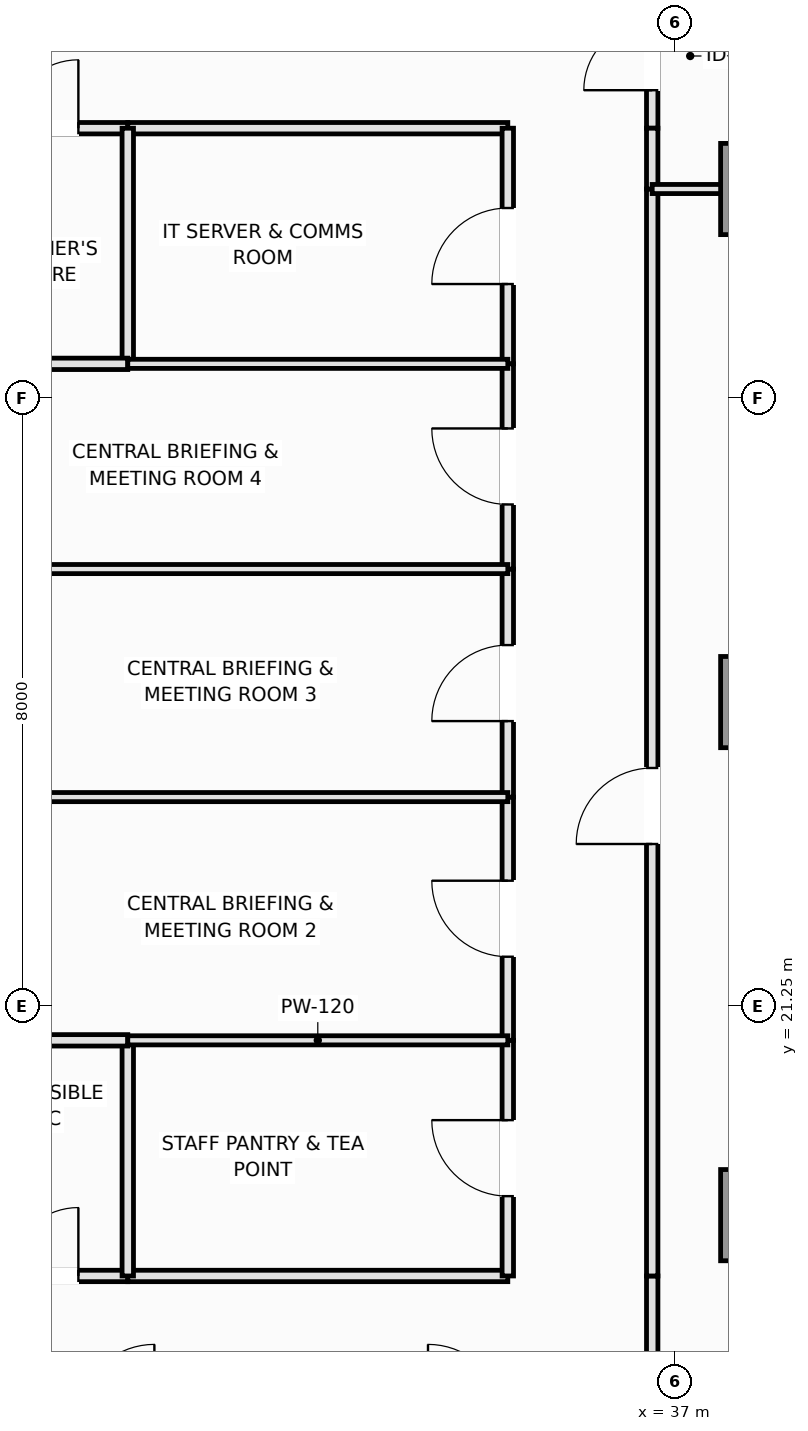
"""IFC4 building model, lengths in metres.
Left out: names, types, materials, properties, quantities, classifications, styles, units other than length and angle.
Written with IfcOpenShell. Run it as: python <this file> out.ifc"""

import sys

from ifc_helpers import new_model, si_unit, direction, frame, frame_2d, origin, origin_2d, place, context, subcontext, project, spatial, rectangle, extrude, element, fill, save


model = new_model("IFC4")
c1 = context("Model", 3, precision=1e-05, world=origin(), true_north=direction((0.0, 1.0)))
c2 = subcontext(c1, "Body", "Model", "MODEL_VIEW")
j1 = project(units=[si_unit("LENGTHUNIT", "METRE"), si_unit("PLANEANGLEUNIT", "RADIAN")], contexts=[c1])
p1 = place(None, origin())
s1 = spatial("IfcSite", under=j1, at=p1, CompositionType="ELEMENT")
p2 = place(p1, origin())
s2 = spatial("IfcBuilding", under=s1, at=p2, CompositionType="ELEMENT")
p3 = place(p2, frame((0.0, 0.0, 75.3)))
s3 = spatial("IfcBuildingStorey", under=s2, at=p3, CompositionType="ELEMENT", Elevation=75.3)
for number, where, z_axis, x_axis in (
    (1, (38.2, 18.5, 0.0), (0.0, 0.0, 1.0), (1.0, 0.0, 0.0)),
    (2, (38.2, 25.25, 0.0), (0.0, 0.0, 1.0), (1.0, 0.0, 0.0)),
    (3, (38.2, 32.0, 0.0), (0.0, 0.0, 1.0), (1.0, 0.0, 0.0)),
):
    element("IfcColumn", number, at=place(p3, frame(where, z_axis=z_axis, x_axis=x_axis)), inside=s3, PredefinedType="COLUMN", context=c2, shape_type="SweptSolid", body=[
        extrude(rectangle(XDim=1.2, YDim=1.2, at=origin_2d()), origin(), (0.0, 0.0, 1.0), 3.55),
    ])
p4 = place(p3, frame((27.6, 17.7, 0.0), z_axis=(0.0, 0.0, 1.0), x_axis=(1.0, 0.0, 0.0)))
e4 = element("IfcWall", 4, at=p4, inside=s3, PredefinedType="PLUMBINGWALL", context=c2, shape_type="SweptSolid", body=[
    extrude(rectangle(XDim=2.2, YDim=0.15, at=frame_2d((1.1, 0.0))), origin(), (0.0, 0.0, 1.0), 3.37),
])
p5 = place(p4, frame((0.65, 0.0, 0.0)))
e5 = element("IfcOpeningElement", 5, at=p5, cuts=e4, PredefinedType="OPENING", context=c2, shape_type="SweptSolid", body=[
    extrude(rectangle(XDim=0.9, YDim=2.1, at=frame_2d((0.45, 1.05))), frame((0.0, 0.085, 0.0), z_axis=(0.0, -1.0, 0.0), x_axis=(1.0, 0.0, 0.0)), (0.0, 0.0, 1.0), 0.17),
])
p6 = place(p3, frame((29.8, 17.7, 0.0), z_axis=(0.0, 0.0, 1.0), x_axis=(1.0, 0.0, 0.0)))
e6 = element("IfcWall", 6, at=p6, inside=s3, PredefinedType="PARTITIONING", context=c2, shape_type="SweptSolid", body=[
    extrude(rectangle(XDim=5.0, YDim=0.15, at=frame_2d((2.5, 0.0))), origin(), (0.0, 0.0, 1.0), 3.37),
])
p7 = place(p3, frame((36.7, 15.8, 0.0), z_axis=(0.0, 0.0, 1.0), x_axis=(0.0, 1.0, 0.0)))
e7 = element("IfcWall", 7, at=p7, inside=s3, PredefinedType="PARTITIONING", context=c2, shape_type="SweptSolid", body=[
    extrude(rectangle(XDim=1.9, YDim=0.15, at=frame_2d((0.95, 0.0))), origin(), (0.0, 0.0, 1.0), 3.37),
])
p8 = place(p3, frame((27.6, 32.8, 0.0), z_axis=(0.0, 0.0, 1.0), x_axis=(1.0, 0.0, 0.0)))
e8 = element("IfcWall", 8, at=p8, inside=s3, PredefinedType="PLUMBINGWALL", context=c2, shape_type="SweptSolid", body=[
    extrude(rectangle(XDim=2.2, YDim=0.15, at=frame_2d((1.1, 0.0))), origin(), (0.0, 0.0, 1.0), 3.37),
])
p9 = place(p8, frame((0.65, 0.0, 0.0)))
e9 = element("IfcOpeningElement", 9, at=p9, cuts=e8, PredefinedType="OPENING", context=c2, shape_type="SweptSolid", body=[
    extrude(rectangle(XDim=0.9, YDim=2.1, at=frame_2d((0.45, 1.05))), frame((0.0, 0.085, 0.0), z_axis=(0.0, -1.0, 0.0), x_axis=(1.0, 0.0, 0.0)), (0.0, 0.0, 1.0), 0.17),
])
p10 = place(p3, frame((29.8, 32.8, 0.0), z_axis=(0.0, 0.0, 1.0), x_axis=(1.0, 0.0, 0.0)))
e10 = element("IfcWall", 10, at=p10, inside=s3, PredefinedType="PARTITIONING", context=c2, shape_type="SweptSolid", body=[
    extrude(rectangle(XDim=5.0, YDim=0.15, at=frame_2d((2.5, 0.0))), origin(), (0.0, 0.0, 1.0), 3.37),
])
p11 = place(p3, frame((36.7, 32.8, 0.0), z_axis=(0.0, 0.0, 1.0), x_axis=(0.0, 1.0, 0.0)))
e11 = element("IfcWall", 11, at=p11, inside=s3, PredefinedType="PARTITIONING", context=c2, shape_type="SweptSolid", body=[
    extrude(rectangle(XDim=1.9, YDim=0.15, at=frame_2d((0.95, 0.0))), origin(), (0.0, 0.0, 1.0), 3.37),
])
p12 = place(p11, frame((0.5, 0.0, 0.0)))
e12 = element("IfcOpeningElement", 12, at=p12, cuts=e11, PredefinedType="OPENING", context=c2, shape_type="SweptSolid", body=[
    extrude(rectangle(XDim=0.9, YDim=2.1, at=frame_2d((0.45, 1.05))), frame((0.0, 0.085, 0.0), z_axis=(0.0, -1.0, 0.0), x_axis=(1.0, 0.0, 0.0)), (0.0, 0.0, 1.0), 0.17),
])
p13 = place(p3, frame((34.8, 17.7, 0.0), z_axis=(0.0, 0.0, 1.0), x_axis=(0.0, 1.0, 0.0)))
e13 = element("IfcWall", 13, at=p13, inside=s3, PredefinedType="PARTITIONING", context=c2, shape_type="SweptSolid", body=[
    extrude(rectangle(XDim=3.1, YDim=0.15, at=frame_2d((1.55, 0.0))), origin(), (0.0, 0.0, 1.0), 3.37),
])
p14 = place(p13, frame((1.05, 0.0, 0.0)))
e14 = element("IfcOpeningElement", 14, at=p14, cuts=e13, PredefinedType="OPENING", context=c2, shape_type="SweptSolid", body=[
    extrude(rectangle(XDim=1.0, YDim=2.15, at=frame_2d((0.5, 1.075))), frame((0.0, 0.085, 0.0), z_axis=(0.0, -1.0, 0.0), x_axis=(1.0, 0.0, 0.0)), (0.0, 0.0, 1.0), 0.17),
])
p15 = place(p3, frame((34.8, 29.7, 0.0), z_axis=(0.0, 0.0, 1.0), x_axis=(0.0, 1.0, 0.0)))
e15 = element("IfcWall", 15, at=p15, inside=s3, PredefinedType="PARTITIONING", context=c2, shape_type="SweptSolid", body=[
    extrude(rectangle(XDim=3.1, YDim=0.15, at=frame_2d((1.55, 0.0))), origin(), (0.0, 0.0, 1.0), 3.37),
])
p16 = place(p15, frame((1.05, 0.0, 0.0)))
e16 = element("IfcOpeningElement", 16, at=p16, cuts=e15, PredefinedType="OPENING", context=c2, shape_type="SweptSolid", body=[
    extrude(rectangle(XDim=1.0, YDim=2.15, at=frame_2d((0.5, 1.075))), frame((0.0, 0.085, 0.0), z_axis=(0.0, -1.0, 0.0), x_axis=(1.0, 0.0, 0.0)), (0.0, 0.0, 1.0), 0.17),
])
p17 = place(p3, frame((34.8, 20.8, 0.0), z_axis=(0.0, 0.0, 1.0), x_axis=(0.0, 1.0, 0.0)))
e17 = element("IfcWall", 17, at=p17, inside=s3, PredefinedType="PARTITIONING", context=c2, shape_type="SweptSolid", body=[
    extrude(rectangle(XDim=3.2, YDim=0.15, at=frame_2d((1.6, 0.0))), origin(), (0.0, 0.0, 1.0), 3.37),
])
p18 = place(p17, frame((1.1, 0.0, 0.0)))
e18 = element("IfcOpeningElement", 18, at=p18, cuts=e17, PredefinedType="OPENING", context=c2, shape_type="SweptSolid", body=[
    extrude(rectangle(XDim=1.0, YDim=2.15, at=frame_2d((0.5, 1.075))), frame((0.0, 0.085, 0.0), z_axis=(0.0, -1.0, 0.0), x_axis=(1.0, 0.0, 0.0)), (0.0, 0.0, 1.0), 0.17),
])
p19 = place(p3, frame((34.8, 24.0, 0.0), z_axis=(0.0, 0.0, 1.0), x_axis=(0.0, 1.0, 0.0)))
e19 = element("IfcWall", 19, at=p19, inside=s3, PredefinedType="PARTITIONING", context=c2, shape_type="SweptSolid", body=[
    extrude(rectangle(XDim=3.0, YDim=0.15, at=frame_2d((1.5, 0.0))), origin(), (0.0, 0.0, 1.0), 3.37),
])
p20 = place(p19, frame((1.0, 0.0, 0.0)))
e20 = element("IfcOpeningElement", 20, at=p20, cuts=e19, PredefinedType="OPENING", context=c2, shape_type="SweptSolid", body=[
    extrude(rectangle(XDim=1.0, YDim=2.15, at=frame_2d((0.5, 1.075))), frame((0.0, 0.085, 0.0), z_axis=(0.0, -1.0, 0.0), x_axis=(1.0, 0.0, 0.0)), (0.0, 0.0, 1.0), 0.17),
])
p21 = place(p3, frame((34.8, 27.0, 0.0), z_axis=(0.0, 0.0, 1.0), x_axis=(0.0, 1.0, 0.0)))
e21 = element("IfcWall", 21, at=p21, inside=s3, PredefinedType="PARTITIONING", context=c2, shape_type="SweptSolid", body=[
    extrude(rectangle(XDim=2.7, YDim=0.15, at=frame_2d((1.35, 0.0))), origin(), (0.0, 0.0, 1.0), 3.37),
])
p22 = place(p21, frame((0.85, 0.0, 0.0)))
e22 = element("IfcOpeningElement", 22, at=p22, cuts=e21, PredefinedType="OPENING", context=c2, shape_type="SweptSolid", body=[
    extrude(rectangle(XDim=1.0, YDim=2.15, at=frame_2d((0.5, 1.075))), frame((0.0, 0.085, 0.0), z_axis=(0.0, -1.0, 0.0), x_axis=(1.0, 0.0, 0.0)), (0.0, 0.0, 1.0), 0.17),
])
p23 = place(p3, frame((36.7, 17.7, 0.0), z_axis=(0.0, 0.0, 1.0), x_axis=(0.0, 1.0, 0.0)))
e23 = element("IfcWall", 23, at=p23, inside=s3, PredefinedType="PARTITIONING", context=c2, shape_type="SweptSolid", body=[
    extrude(rectangle(XDim=14.3, YDim=0.15, at=frame_2d((7.15, 0.0))), origin(), (0.0, 0.0, 1.0), 3.37),
])
p24 = place(p23, frame((5.683, 0.0, 0.0)))
e24 = element("IfcOpeningElement", 24, at=p24, cuts=e23, PredefinedType="OPENING", context=c2, shape_type="SweptSolid", body=[
    extrude(rectangle(XDim=1.0, YDim=2.15, at=frame_2d((0.5, 1.075))), frame((0.0, 0.085, 0.0), z_axis=(0.0, -1.0, 0.0), x_axis=(1.0, 0.0, 0.0)), (0.0, 0.0, 1.0), 0.17),
])
p25 = place(p3, frame((36.7, 32.0, 0.0), z_axis=(0.0, 0.0, 1.0), x_axis=(0.0, 1.0, 0.0)))
e25 = element("IfcWall", 25, at=p25, inside=s3, PredefinedType="PARTITIONING", context=c2, shape_type="SweptSolid", body=[
    extrude(rectangle(XDim=0.8, YDim=0.15, at=frame_2d((0.4, 0.0))), origin(), (0.0, 0.0, 1.0), 3.37),
])
p26 = place(p3, frame((29.8, 17.7, 0.0), z_axis=(0.0, 0.0, 1.0), x_axis=(0.0, 1.0, 0.0)))
e26 = element("IfcWall", 26, at=p26, inside=s3, PredefinedType="PLUMBINGWALL", context=c2, shape_type="SweptSolid", body=[
    extrude(rectangle(XDim=3.1, YDim=0.15, at=frame_2d((1.55, 0.0))), origin(), (0.0, 0.0, 1.0), 3.37),
])
p27 = place(p3, frame((27.6, 20.8, 0.0), z_axis=(0.0, 0.0, 1.0), x_axis=(1.0, 0.0, 0.0)))
e27 = element("IfcWall", 27, at=p27, inside=s3, PredefinedType="PLUMBINGWALL", context=c2, shape_type="SweptSolid", body=[
    extrude(rectangle(XDim=2.2, YDim=0.15, at=frame_2d((1.1, 0.0))), origin(), (0.0, 0.0, 1.0), 3.37),
])
p28 = place(p3, frame((29.8, 29.7, 0.0), z_axis=(0.0, 0.0, 1.0), x_axis=(0.0, 1.0, 0.0)))
e28 = element("IfcWall", 28, at=p28, inside=s3, PredefinedType="PLUMBINGWALL", context=c2, shape_type="SweptSolid", body=[
    extrude(rectangle(XDim=3.1, YDim=0.15, at=frame_2d((1.55, 0.0))), origin(), (0.0, 0.0, 1.0), 3.37),
])
p29 = place(p3, frame((27.6, 29.7, 0.0), z_axis=(0.0, 0.0, 1.0), x_axis=(1.0, 0.0, 0.0)))
e29 = element("IfcWall", 29, at=p29, inside=s3, PredefinedType="PLUMBINGWALL", context=c2, shape_type="SweptSolid", body=[
    extrude(rectangle(XDim=2.2, YDim=0.15, at=frame_2d((1.1, 0.0))), origin(), (0.0, 0.0, 1.0), 3.37),
])
for number, where, z_axis, x_axis in (
    (30, (29.8, 20.8, 0.0), (0.0, 0.0, 1.0), (1.0, 0.0, 0.0)),
    (31, (29.8, 29.7, 0.0), (0.0, 0.0, 1.0), (1.0, 0.0, 0.0)),
):
    element("IfcWall", number, at=place(p3, frame(where, z_axis=z_axis, x_axis=x_axis)), inside=s3, PredefinedType="PARTITIONING", context=c2, shape_type="SweptSolid", body=[
        extrude(rectangle(XDim=5.0, YDim=0.12, at=frame_2d((2.5, 0.0))), origin(), (0.0, 0.0, 1.0), 3.37),
    ])
for number, where, z_axis, x_axis in (
    (32, (27.5, 24.0, 0.0), (0.0, 0.0, 1.0), (1.0, 0.0, 0.0)),
    (33, (27.5, 27.0, 0.0), (0.0, 0.0, 1.0), (1.0, 0.0, 0.0)),
):
    element("IfcWall", number, at=place(p3, frame(where, z_axis=z_axis, x_axis=x_axis)), inside=s3, PredefinedType="PARTITIONING", context=c2, shape_type="SweptSolid", body=[
        extrude(rectangle(XDim=7.3, YDim=0.12, at=frame_2d((3.65, 0.0))), origin(), (0.0, 0.0, 1.0), 3.37),
    ])
p30 = place(p3, frame((36.7, 32.0, 0.0), z_axis=(0.0, 0.0, 1.0), x_axis=(1.0, 0.0, 0.0)))
e34 = element("IfcWall", 34, at=p30, inside=s3, PredefinedType="PARTITIONING", context=c2, shape_type="SweptSolid", body=[
    extrude(rectangle(XDim=16.79, YDim=0.12, at=frame_2d((8.395, 0.0))), origin(), (0.0, 0.0, 1.0), 2.72),
])
p31 = place(p5, origin())
e35 = element("IfcDoor", 35, at=p31, inside=s3, OperationType="SINGLE_SWING_RIGHT", PredefinedType="DOOR", context=c2, shape_type="SweptSolid", body=[
    extrude(rectangle(XDim=0.9, YDim=2.1, at=frame_2d((0.45, 1.05))), frame((0.0, 0.025, 0.0), z_axis=(0.0, -1.0, 0.0), x_axis=(1.0, 0.0, 0.0)), (0.0, 0.0, 1.0), 0.05),
])
fill(e5, e35)
p32 = place(p9, origin())
e36 = element("IfcDoor", 36, at=p32, inside=s3, OperationType="SINGLE_SWING_RIGHT", PredefinedType="DOOR", context=c2, shape_type="SweptSolid", body=[
    extrude(rectangle(XDim=0.9, YDim=2.1, at=frame_2d((0.45, 1.05))), frame((0.0, 0.025, 0.0), z_axis=(0.0, -1.0, 0.0), x_axis=(1.0, 0.0, 0.0)), (0.0, 0.0, 1.0), 0.05),
])
fill(e9, e36)
p33 = place(p12, origin())
e37 = element("IfcDoor", 37, at=p33, inside=s3, OperationType="SINGLE_SWING_LEFT", PredefinedType="DOOR", context=c2, shape_type="SweptSolid", body=[
    extrude(rectangle(XDim=0.9, YDim=2.1, at=frame_2d((0.45, 1.05))), frame((0.0, 0.025, 0.0), z_axis=(0.0, -1.0, 0.0), x_axis=(1.0, 0.0, 0.0)), (0.0, 0.0, 1.0), 0.05),
])
fill(e12, e37)
p34 = place(p14, origin())
e38 = element("IfcDoor", 38, at=p34, inside=s3, OperationType="SINGLE_SWING_RIGHT", PredefinedType="DOOR", context=c2, shape_type="SweptSolid", body=[
    extrude(rectangle(XDim=1.0, YDim=2.15, at=frame_2d((0.5, 1.075))), frame((0.0, 0.025, 0.0), z_axis=(0.0, -1.0, 0.0), x_axis=(1.0, 0.0, 0.0)), (0.0, 0.0, 1.0), 0.05),
])
fill(e14, e38)
p35 = place(p16, origin())
e39 = element("IfcDoor", 39, at=p35, inside=s3, OperationType="SINGLE_SWING_LEFT", PredefinedType="DOOR", context=c2, shape_type="SweptSolid", body=[
    extrude(rectangle(XDim=1.0, YDim=2.15, at=frame_2d((0.5, 1.075))), frame((0.0, 0.025, 0.0), z_axis=(0.0, -1.0, 0.0), x_axis=(1.0, 0.0, 0.0)), (0.0, 0.0, 1.0), 0.05),
])
fill(e16, e39)
p36 = place(p18, origin())
e40 = element("IfcDoor", 40, at=p36, inside=s3, OperationType="SINGLE_SWING_RIGHT", PredefinedType="DOOR", context=c2, shape_type="SweptSolid", body=[
    extrude(rectangle(XDim=1.0, YDim=2.15, at=frame_2d((0.5, 1.075))), frame((0.0, 0.025, 0.0), z_axis=(0.0, -1.0, 0.0), x_axis=(1.0, 0.0, 0.0)), (0.0, 0.0, 1.0), 0.05),
])
fill(e18, e40)
p37 = place(p20, origin())
e41 = element("IfcDoor", 41, at=p37, inside=s3, OperationType="SINGLE_SWING_LEFT", PredefinedType="DOOR", context=c2, shape_type="SweptSolid", body=[
    extrude(rectangle(XDim=1.0, YDim=2.15, at=frame_2d((0.5, 1.075))), frame((0.0, 0.025, 0.0), z_axis=(0.0, -1.0, 0.0), x_axis=(1.0, 0.0, 0.0)), (0.0, 0.0, 1.0), 0.05),
])
fill(e20, e41)
p38 = place(p22, origin())
e42 = element("IfcDoor", 42, at=p38, inside=s3, OperationType="SINGLE_SWING_RIGHT", PredefinedType="DOOR", context=c2, shape_type="SweptSolid", body=[
    extrude(rectangle(XDim=1.0, YDim=2.15, at=frame_2d((0.5, 1.075))), frame((0.0, 0.025, 0.0), z_axis=(0.0, -1.0, 0.0), x_axis=(1.0, 0.0, 0.0)), (0.0, 0.0, 1.0), 0.05),
])
fill(e22, e42)
p39 = place(p24, origin())
e43 = element("IfcDoor", 43, at=p39, inside=s3, OperationType="SINGLE_SWING_LEFT", PredefinedType="DOOR", context=c2, shape_type="SweptSolid", body=[
    extrude(rectangle(XDim=1.0, YDim=2.15, at=frame_2d((0.5, 1.075))), frame((0.0, 0.025, 0.0), z_axis=(0.0, -1.0, 0.0), x_axis=(1.0, 0.0, 0.0)), (0.0, 0.0, 1.0), 0.05),
])
fill(e24, e43)
save(model, sys.argv[1])
